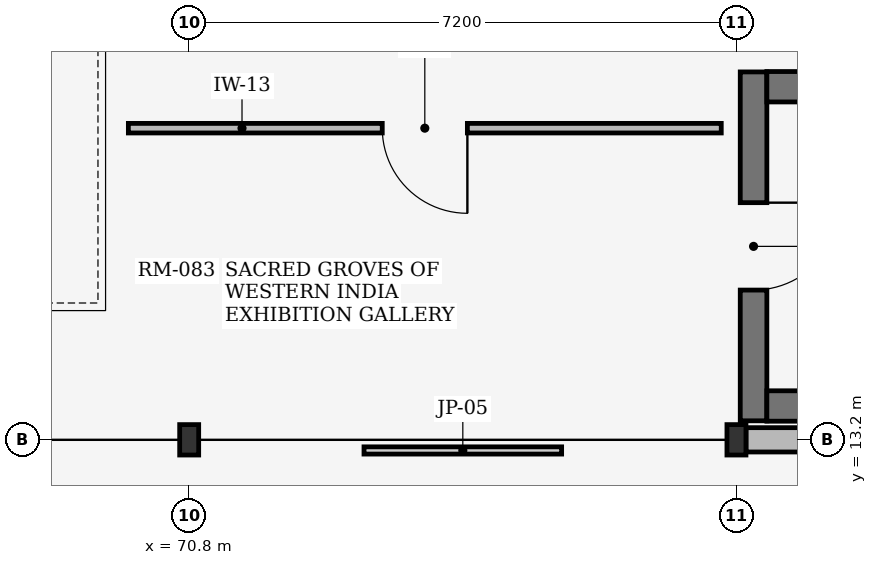
"""IFC4 building model, lengths in metres.
Left out: names, types, materials, properties, quantities, classifications, styles, units other than length and angle.
Written with IfcOpenShell. Run it as: python <this file> out.ifc"""

import sys

from ifc_helpers import new_model, si_unit, direction, frame, frame_2d, origin, origin_2d, place, context, subcontext, project, spatial, rectangle, i_section, extrude, element, fill, save


model = new_model("IFC4")
c1 = context("Model", 3, precision=1e-05, world=origin(), true_north=direction((0.0, 1.0)))
c2 = subcontext(c1, "Body", "Model", "MODEL_VIEW")
j1 = project(units=[si_unit("LENGTHUNIT", "METRE"), si_unit("PLANEANGLEUNIT", "RADIAN")], contexts=[c1])
p1 = place(None, origin())
s1 = spatial("IfcSite", under=j1, at=p1, CompositionType="ELEMENT")
p2 = place(p1, origin())
s2 = spatial("IfcBuilding", under=s1, at=p2, CompositionType="ELEMENT")
p3 = place(p2, frame((0.0, 0.0, 4.8)))
s3 = spatial("IfcBuildingStorey", under=s2, at=p3, CompositionType="ELEMENT", Elevation=4.8)
for number, where, z_axis, x_axis in (
    (1, (70.8, 13.2, 0.0), (0.0, 0.0, 1.0), (1.0, 0.0, 0.0)),
    (2, (78.0, 13.2, 0.0), (0.0, 0.0, 1.0), (1.0, 0.0, 0.0)),
):
    element("IfcColumn", number, at=place(p3, frame(where, z_axis=z_axis, x_axis=x_axis)), inside=s3, PredefinedType="COLUMN", context=c2, shape_type="SweptSolid", body=[
        extrude(i_section(OverallWidth=0.25, OverallDepth=0.4, WebThickness=0.01, FlangeThickness=0.013, at=origin_2d()), origin(), (0.0, 0.0, 1.0), 3.95),
    ])
p4 = place(p3, frame((78.125, 13.2, 0.0), z_axis=(0.0, 0.0, 1.0), x_axis=(1.0, 0.0, 0.0)))
e3 = element("IfcWall", 3, at=p4, inside=s3, PredefinedType="STANDARD", context=c2, shape_type="SweptSolid", body=[
    extrude(rectangle(XDim=8.75, YDim=0.32, at=frame_2d((4.375, 0.0))), origin(), (0.0, 0.0, 1.0), 3.41),
])
p5 = place(p4, frame((3.6, 0.0, 0.75)))
e4 = element("IfcOpeningElement", 4, at=p5, cuts=e3, PredefinedType="OPENING", context=c2, shape_type="SweptSolid", body=[
    extrude(rectangle(XDim=1.55, YDim=1.35, at=frame_2d((0.775, 0.675))), frame((0.0, 0.17, 0.0), z_axis=(0.0, -1.0, 0.0), x_axis=(1.0, 0.0, 0.0)), (0.0, 0.0, 1.0), 0.34),
])
p6 = place(p3, frame((78.225, 13.45, 0.0), z_axis=(0.0, 0.0, 1.0), x_axis=(0.0, 1.0, 0.0)))
e5 = element("IfcWall", 5, at=p6, inside=s3, PredefinedType="SHEAR", context=c2, shape_type="SweptSolid", body=[
    extrude(rectangle(XDim=4.59, YDim=0.35, at=frame_2d((2.295, 0.0))), origin(), (0.0, 0.0, 1.0), 3.95),
])
p7 = place(p6, frame((1.72, 0.0, 0.0)))
e6 = element("IfcOpeningElement", 6, at=p7, cuts=e5, PredefinedType="OPENING", context=c2, shape_type="SweptSolid", body=[
    extrude(rectangle(XDim=1.15, YDim=2.2, at=frame_2d((0.575, 1.1))), frame((0.0, 0.185, 0.0), z_axis=(0.0, -1.0, 0.0), x_axis=(1.0, 0.0, 0.0)), (0.0, 0.0, 1.0), 0.37),
])
for number, where, z_axis, x_axis in (
    (7, (78.4, 13.645, 0.0), (0.0, 0.0, 1.0), (1.0, 0.0, 0.0)),
    (8, (78.4, 17.845, 0.0), (0.0, 0.0, 1.0), (1.0, 0.0, 0.0)),
):
    element("IfcWall", number, at=place(p3, frame(where, z_axis=z_axis, x_axis=x_axis)), inside=s3, PredefinedType="SHEAR", context=c2, shape_type="SweptSolid", body=[
        extrude(rectangle(XDim=7.98, YDim=0.4, at=frame_2d((3.99, 0.0))), origin(), (0.0, 0.0, 1.0), 3.95),
    ])
p8 = place(p3, frame((70.0, 17.3, 0.0), z_axis=(0.0, 0.0, 1.0), x_axis=(1.0, 0.0, 0.0)))
e9 = element("IfcWall", 9, at=p8, inside=s3, PredefinedType="PARTITIONING", context=c2, shape_type="SweptSolid", body=[
    extrude(rectangle(XDim=7.8, YDim=0.126, at=frame_2d((3.9, 0.0))), origin(), (0.0, 0.0, 1.0), 3.93),
])
p9 = place(p8, frame((3.34, 0.0, 0.0)))
e10 = element("IfcOpeningElement", 10, at=p9, cuts=e9, PredefinedType="OPENING", context=c2, shape_type="SweptSolid", body=[
    extrude(rectangle(XDim=1.12, YDim=2.22, at=frame_2d((0.56, 1.11))), frame((0.0, 0.073, 0.0), z_axis=(0.0, -1.0, 0.0), x_axis=(1.0, 0.0, 0.0)), (0.0, 0.0, 1.0), 0.146),
])
p10 = place(p7, origin())
e11 = element("IfcDoor", 11, at=p10, inside=s3, OperationType="SINGLE_SWING_RIGHT", PredefinedType="DOOR", context=c2, shape_type="SweptSolid", body=[
    extrude(rectangle(XDim=1.15, YDim=2.2, at=frame_2d((0.575, 1.1))), frame((0.0, 0.025, 0.0), z_axis=(0.0, -1.0, 0.0), x_axis=(1.0, 0.0, 0.0)), (0.0, 0.0, 1.0), 0.05),
])
fill(e6, e11)
p11 = place(p9, origin())
e12 = element("IfcDoor", 12, at=p11, inside=s3, OperationType="SINGLE_SWING_RIGHT", PredefinedType="DOOR", context=c2, shape_type="SweptSolid", body=[
    extrude(rectangle(XDim=1.12, YDim=2.22, at=frame_2d((0.56, 1.11))), frame((0.0, 0.025, 0.0), z_axis=(0.0, -1.0, 0.0), x_axis=(1.0, 0.0, 0.0)), (0.0, 0.0, 1.0), 0.05),
])
fill(e10, e12)
save(model, sys.argv[1])
